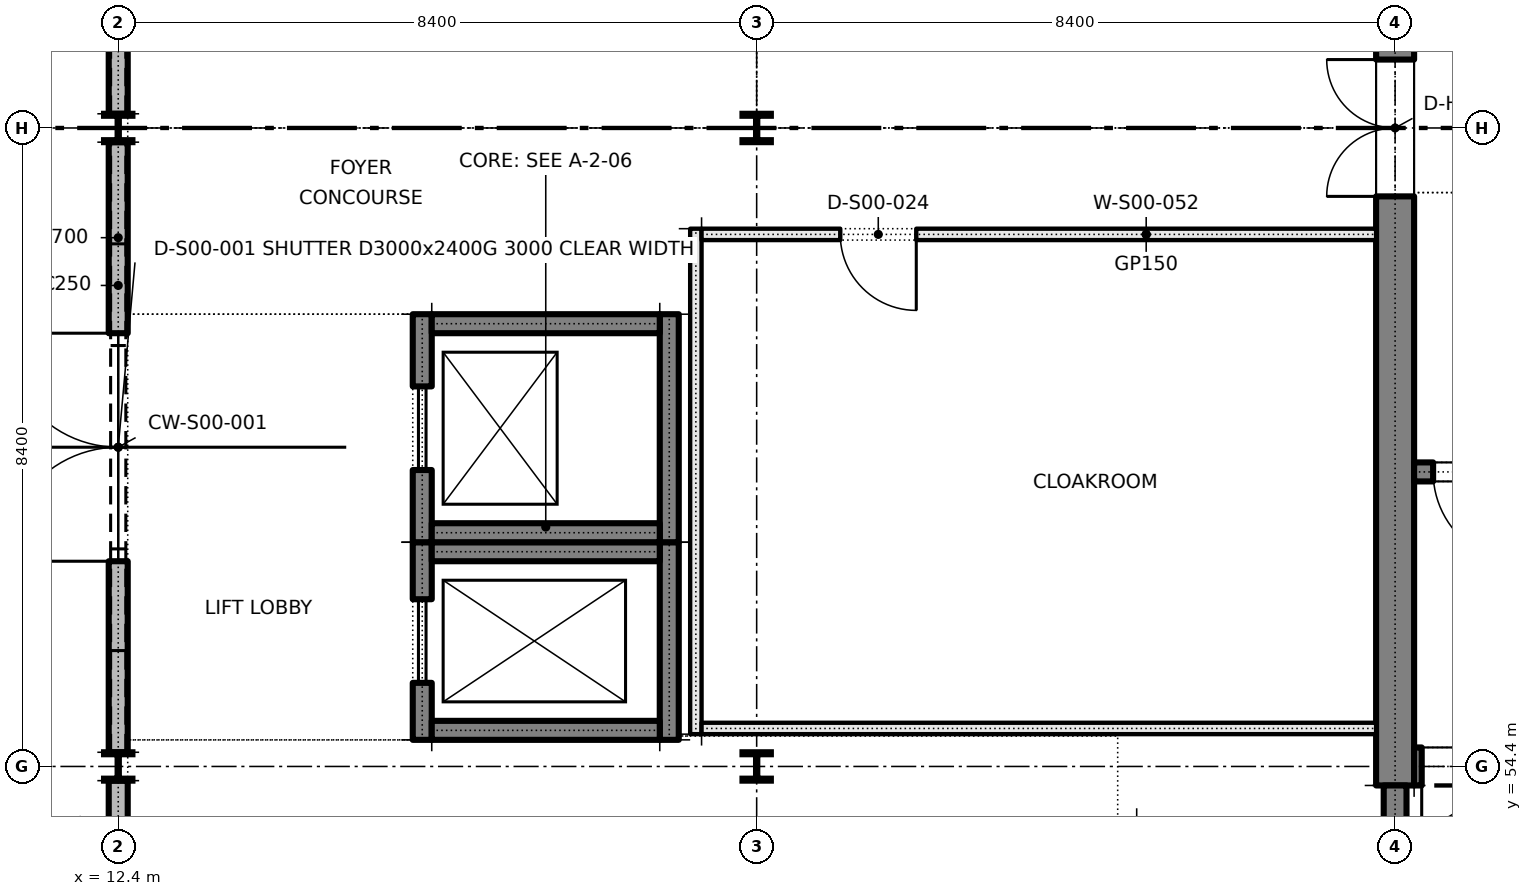
"""IFC4 building model, lengths in metres.
Left out: names, types, materials, properties, quantities, classifications, styles, units other than length and angle.
Written with IfcOpenShell. Run it as: python <this file> out.ifc"""

import sys

from ifc_helpers import new_model, si_unit, direction, frame, frame_2d, origin, origin_2d, place, context, subcontext, project, spatial, rectangle, i_section, extrude, element, fill, save


model = new_model("IFC4")
c1 = context("Model", 3, precision=1e-05, world=origin(), true_north=direction((0.0, 1.0)))
c2 = subcontext(c1, "Body", "Model", "MODEL_VIEW")
j1 = project(units=[si_unit("LENGTHUNIT", "METRE"), si_unit("PLANEANGLEUNIT", "RADIAN")], contexts=[c1])
p1 = place(None, origin())
s1 = spatial("IfcSite", under=j1, at=p1, CompositionType="ELEMENT")
p2 = place(p1, origin())
s2 = spatial("IfcBuilding", under=s1, at=p2, CompositionType="ELEMENT")
p3 = place(p2, origin())
s3 = spatial("IfcBuildingStorey", under=s2, at=p3, CompositionType="ELEMENT", Elevation=0.0)
p4 = place(p3, frame((29.2, 54.15, 0.0), z_axis=(0.0, 0.0, 1.0), x_axis=(0.0, 1.0, 0.0)))
e1 = element("IfcWall", 1, at=p4, inside=s3, PredefinedType="SOLIDWALL", context=c2, shape_type="SweptSolid", body=[
    extrude(rectangle(XDim=42.5, YDim=0.5, at=frame_2d((21.25, 0.0))), origin(), (0.0, 0.0, 1.0), 5.4),
])
p5 = place(p4, frame((7.75, 0.0, 0.0)))
e2 = element("IfcOpeningElement", 2, at=p5, cuts=e1, PredefinedType="OPENING", context=c2, shape_type="SweptSolid", body=[
    extrude(rectangle(XDim=1.8, YDim=2.1, at=frame_2d((0.9, 1.05))), frame((0.0, 0.26, 0.0), z_axis=(0.0, -1.0, 0.0), x_axis=(1.0, 0.0, 0.0)), (0.0, 0.0, 1.0), 0.52),
])
p6 = place(p4, frame((20.35, 0.0, 0.0)))
e3 = element("IfcOpeningElement", 3, at=p6, cuts=e1, PredefinedType="OPENING", context=c2, shape_type="SweptSolid", body=[
    extrude(rectangle(XDim=1.8, YDim=2.1, at=frame_2d((0.9, 1.05))), frame((0.0, 0.26, 0.0), z_axis=(0.0, -1.0, 0.0), x_axis=(1.0, 0.0, 0.0)), (0.0, 0.0, 1.0), 0.52),
])
p7 = place(p4, frame((32.95, 0.0, 0.0)))
e4 = element("IfcOpeningElement", 4, at=p7, cuts=e1, PredefinedType="OPENING", context=c2, shape_type="SweptSolid", body=[
    extrude(rectangle(XDim=1.8, YDim=2.1, at=frame_2d((0.9, 1.05))), frame((0.0, 0.26, 0.0), z_axis=(0.0, -1.0, 0.0), x_axis=(1.0, 0.0, 0.0)), (0.0, 0.0, 1.0), 0.52),
])
p8 = place(p3, frame((29.45, 54.4, 0.0), z_axis=(0.0, 0.0, 1.0), x_axis=(1.0, 0.0, 0.0)))
e5 = element("IfcWall", 5, at=p8, inside=s3, PredefinedType="SOLIDWALL", context=c2, shape_type="SweptSolid", body=[
    extrude(rectangle(XDim=66.7, YDim=0.5, at=frame_2d((33.35, 0.0))), origin(), (0.0, 0.0, 1.0), 5.4),
])
p9 = place(p8, frame((11.75, 0.0, 0.9)))
e6 = element("IfcOpeningElement", 6, at=p9, cuts=e5, PredefinedType="OPENING", context=c2, shape_type="SweptSolid", body=[
    extrude(rectangle(XDim=1.2, YDim=3.6, at=frame_2d((0.6, 1.8))), frame((0.0, 0.26, 0.0), z_axis=(0.0, -1.0, 0.0), x_axis=(1.0, 0.0, 0.0)), (0.0, 0.0, 1.0), 0.52),
])
p10 = place(p8, frame((20.15, 0.0, 0.9)))
e7 = element("IfcOpeningElement", 7, at=p10, cuts=e5, PredefinedType="OPENING", context=c2, shape_type="SweptSolid", body=[
    extrude(rectangle(XDim=1.2, YDim=3.6, at=frame_2d((0.6, 1.8))), frame((0.0, 0.26, 0.0), z_axis=(0.0, -1.0, 0.0), x_axis=(1.0, 0.0, 0.0)), (0.0, 0.0, 1.0), 0.52),
])
p11 = place(p8, frame((28.55, 0.0, 0.9)))
e8 = element("IfcOpeningElement", 8, at=p11, cuts=e5, PredefinedType="OPENING", context=c2, shape_type="SweptSolid", body=[
    extrude(rectangle(XDim=1.2, YDim=3.6, at=frame_2d((0.6, 1.8))), frame((0.0, 0.26, 0.0), z_axis=(0.0, -1.0, 0.0), x_axis=(1.0, 0.0, 0.0)), (0.0, 0.0, 1.0), 0.52),
])
p12 = place(p8, frame((36.95, 0.0, 0.9)))
e9 = element("IfcOpeningElement", 9, at=p12, cuts=e5, PredefinedType="OPENING", context=c2, shape_type="SweptSolid", body=[
    extrude(rectangle(XDim=1.2, YDim=3.6, at=frame_2d((0.6, 1.8))), frame((0.0, 0.26, 0.0), z_axis=(0.0, -1.0, 0.0), x_axis=(1.0, 0.0, 0.0)), (0.0, 0.0, 1.0), 0.52),
])
p13 = place(p8, frame((45.35, 0.0, 0.9)))
e10 = element("IfcOpeningElement", 10, at=p13, cuts=e5, PredefinedType="OPENING", context=c2, shape_type="SweptSolid", body=[
    extrude(rectangle(XDim=1.2, YDim=3.6, at=frame_2d((0.6, 1.8))), frame((0.0, 0.26, 0.0), z_axis=(0.0, -1.0, 0.0), x_axis=(1.0, 0.0, 0.0)), (0.0, 0.0, 1.0), 0.52),
])
p14 = place(p8, frame((53.75, 0.0, 0.9)))
e11 = element("IfcOpeningElement", 11, at=p14, cuts=e5, PredefinedType="OPENING", context=c2, shape_type="SweptSolid", body=[
    extrude(rectangle(XDim=1.2, YDim=3.6, at=frame_2d((0.6, 1.8))), frame((0.0, 0.26, 0.0), z_axis=(0.0, -1.0, 0.0), x_axis=(1.0, 0.0, 0.0)), (0.0, 0.0, 1.0), 0.52),
])
p15 = place(p8, frame((0.1, 0.0, 0.0)))
e12 = element("IfcOpeningElement", 12, at=p15, cuts=e5, PredefinedType="OPENING", context=c2, shape_type="SweptSolid", body=[
    extrude(rectangle(XDim=1.5, YDim=2.1, at=frame_2d((0.75, 1.05))), frame((0.0, 0.26, 0.0), z_axis=(0.0, -1.0, 0.0), x_axis=(1.0, 0.0, 0.0)), (0.0, 0.0, 1.0), 0.52),
])
p16 = place(p8, frame((59.2, 0.0, 0.0)))
e13 = element("IfcOpeningElement", 13, at=p16, cuts=e5, PredefinedType="OPENING", context=c2, shape_type="SweptSolid", body=[
    extrude(rectangle(XDim=1.5, YDim=2.1, at=frame_2d((0.75, 1.05))), frame((0.0, 0.26, 0.0), z_axis=(0.0, -1.0, 0.0), x_axis=(1.0, 0.0, 0.0)), (0.0, 0.0, 1.0), 0.52),
])
p17 = place(p3, frame((29.45, 58.275, 0.0), z_axis=(0.0, 0.0, 1.0), x_axis=(1.0, 0.0, 0.0)))
e14 = element("IfcWall", 14, at=p17, inside=s3, PredefinedType="SOLIDWALL", context=c2, shape_type="SweptSolid", body=[
    extrude(rectangle(XDim=7.85, YDim=0.25, at=frame_2d((3.925, 0.0))), origin(), (0.0, 0.0, 1.0), 5.4),
])
p18 = place(p17, frame((0.25, 0.0, 0.0)))
e15 = element("IfcOpeningElement", 15, at=p18, cuts=e14, PredefinedType="OPENING", context=c2, shape_type="SweptSolid", body=[
    extrude(rectangle(XDim=1.2, YDim=2.1, at=frame_2d((0.6, 1.05))), frame((0.0, 0.135, 0.0), z_axis=(0.0, -1.0, 0.0), x_axis=(1.0, 0.0, 0.0)), (0.0, 0.0, 1.0), 0.27),
])
for number, where, z_axis, x_axis in (
    (16, (12.4, 54.4, 0.0), (0.0, 0.0, 1.0), (1.0, 0.0, 0.0)),
    (17, (12.4, 62.8, 0.0), (0.0, 0.0, 1.0), (1.0, 0.0, 0.0)),
    (18, (20.8, 54.4, 0.0), (0.0, 0.0, 1.0), (1.0, 0.0, 0.0)),
    (19, (20.8, 62.8, 0.0), (0.0, 0.0, 1.0), (1.0, 0.0, 0.0)),
):
    element("IfcColumn", number, at=place(p3, frame(where, z_axis=z_axis, x_axis=x_axis)), inside=s3, PredefinedType="COLUMN", context=c2, shape_type="SweptSolid", body=[
        extrude(i_section(OverallWidth=0.373, OverallDepth=0.373, WebThickness=0.016, FlangeThickness=0.026, FilletRadius=0.015, at=origin_2d()), origin(), (0.0, 0.0, 1.0), 5.4),
    ])
p19 = place(p3, frame((29.2, 54.17, -0.3), z_axis=(0.0, 0.0, 1.0), x_axis=(0.0, 1.0, 0.0)))
e20 = element("IfcWall", 20, at=p19, inside=s3, PredefinedType="SOLIDWALL", context=c2, shape_type="SweptSolid", body=[
    extrude(rectangle(XDim=42.46, YDim=0.5, at=frame_2d((21.23, 0.0))), origin(), (0.0, 0.0, 1.0), 0.3),
])
p20 = place(p3, frame((29.45, 54.4, -0.5), z_axis=(0.0, 0.0, 1.0), x_axis=(1.0, 0.0, 0.0)))
e21 = element("IfcWall", 21, at=p20, inside=s3, PredefinedType="SOLIDWALL", context=c2, shape_type="SweptSolid", body=[
    extrude(rectangle(XDim=66.7, YDim=0.5, at=frame_2d((33.35, 0.0))), origin(), (0.0, 0.0, 1.0), 0.5),
])
p21 = place(p3, frame((29.45, 58.275, -0.5), z_axis=(0.0, 0.0, 1.0), x_axis=(1.0, 0.0, 0.0)))
e22 = element("IfcWall", 22, at=p21, inside=s3, PredefinedType="SOLIDWALL", context=c2, shape_type="SweptSolid", body=[
    extrude(rectangle(XDim=7.83, YDim=0.25, at=frame_2d((3.915, 0.0))), origin(), (0.0, 0.0, 1.0), 0.5),
])
p22 = place(p3, frame((12.4, 46.225, 0.0), z_axis=(0.0, 0.0, 1.0), x_axis=(0.0, 1.0, 0.0)))
e23 = element("IfcWall", 23, at=p22, inside=s3, PredefinedType="SOLIDWALL", context=c2, shape_type="SweptSolid", body=[
    extrude(rectangle(XDim=7.988, YDim=0.25, at=frame_2d((3.994, 0.0))), origin(), (0.0, 0.0, 1.0), 5.22),
])
p23 = place(p3, frame((12.4, 54.587, 0.0), z_axis=(0.0, 0.0, 1.0), x_axis=(0.0, 1.0, 0.0)))
e24 = element("IfcWall", 24, at=p23, inside=s3, PredefinedType="SOLIDWALL", context=c2, shape_type="SweptSolid", body=[
    extrude(rectangle(XDim=8.027, YDim=0.25, at=frame_2d((4.013, 0.0))), origin(), (0.0, 0.0, 1.0), 2.7),
])
p24 = place(p23, frame((2.513, 0.0, 0.0)))
e25 = element("IfcOpeningElement", 25, at=p24, cuts=e24, PredefinedType="OPENING", context=c2, shape_type="SweptSolid", body=[
    extrude(rectangle(XDim=3.0, YDim=2.4, at=frame_2d((1.5, 1.2))), frame((0.0, 0.135, 0.0), z_axis=(0.0, -1.0, 0.0), x_axis=(1.0, 0.0, 0.0)), (0.0, 0.0, 1.0), 0.27),
])
p25 = place(p3, frame((12.4, 62.987, 0.0), z_axis=(0.0, 0.0, 1.0), x_axis=(0.0, 1.0, 0.0)))
e26 = element("IfcWall", 26, at=p25, inside=s3, PredefinedType="SOLIDWALL", context=c2, shape_type="SweptSolid", body=[
    extrude(rectangle(XDim=8.027, YDim=0.25, at=frame_2d((4.013, 0.0))), origin(), (0.0, 0.0, 1.0), 2.7),
])
p26 = place(p25, frame((2.513, 0.0, 0.0)))
e27 = element("IfcOpeningElement", 27, at=p26, cuts=e26, PredefinedType="OPENING", context=c2, shape_type="SweptSolid", body=[
    extrude(rectangle(XDim=3.0, YDim=2.4, at=frame_2d((1.5, 1.2))), frame((0.0, 0.135, 0.0), z_axis=(0.0, -1.0, 0.0), x_axis=(1.0, 0.0, 0.0)), (0.0, 0.0, 1.0), 0.27),
])
p27 = place(p3, frame((29.2, 46.25, 0.0), z_axis=(0.0, 0.0, 1.0), x_axis=(0.0, 1.0, 0.0)))
e28 = element("IfcWall", 28, at=p27, inside=s3, PredefinedType="SOLIDWALL", context=c2, shape_type="SweptSolid", body=[
    extrude(rectangle(XDim=7.9, YDim=0.3, at=frame_2d((3.95, 0.0))), origin(), (0.0, 0.0, 1.0), 5.4),
])
p28 = place(p27, frame((0.3, 0.0, 0.0)))
e29 = element("IfcOpeningElement", 29, at=p28, cuts=e28, PredefinedType="OPENING", context=c2, shape_type="SweptSolid", body=[
    extrude(rectangle(XDim=1.1, YDim=2.1, at=frame_2d((0.55, 1.05))), frame((0.0, 0.16, 0.0), z_axis=(0.0, -1.0, 0.0), x_axis=(1.0, 0.0, 0.0)), (0.0, 0.0, 1.0), 0.32),
])
p29 = place(p3, frame((16.4, 54.75, 0.0), z_axis=(0.0, 0.0, 1.0), x_axis=(0.0, 1.0, 0.0)))
e30 = element("IfcWall", 30, at=p29, inside=s3, PredefinedType="SOLIDWALL", context=c2, shape_type="SweptSolid", body=[
    extrude(rectangle(XDim=2.6, YDim=0.25, at=frame_2d((1.3, 0.0))), origin(), (0.0, 0.0, 1.0), 5.4),
])
p30 = place(p29, frame((0.75, 0.0, 0.0)))
e31 = element("IfcOpeningElement", 31, at=p30, cuts=e30, PredefinedType="OPENING", context=c2, shape_type="SweptSolid", body=[
    extrude(rectangle(XDim=1.1, YDim=2.1, at=frame_2d((0.55, 1.05))), frame((0.0, 0.135, 0.0), z_axis=(0.0, -1.0, 0.0), x_axis=(1.0, 0.0, 0.0)), (0.0, 0.0, 1.0), 0.27),
])
p31 = place(p3, frame((19.65, 54.75, 0.0), z_axis=(0.0, 0.0, 1.0), x_axis=(0.0, 1.0, 0.0)))
e32 = element("IfcWall", 32, at=p31, inside=s3, PredefinedType="SOLIDWALL", context=c2, shape_type="SweptSolid", body=[
    extrude(rectangle(XDim=2.6, YDim=0.25, at=frame_2d((1.3, 0.0))), origin(), (0.0, 0.0, 1.0), 5.4),
])
for number, where, z_axis, x_axis in (
    (33, (16.525, 54.875, 0.0), (0.0, 0.0, 1.0), (1.0, 0.0, 0.0)),
    (34, (16.525, 57.225, 0.0), (0.0, 0.0, 1.0), (1.0, 0.0, 0.0)),
):
    element("IfcWall", number, at=place(p3, frame(where, z_axis=z_axis, x_axis=x_axis)), inside=s3, PredefinedType="SOLIDWALL", context=c2, shape_type="SweptSolid", body=[
        extrude(rectangle(XDim=3.0, YDim=0.25, at=frame_2d((1.5, 0.0))), origin(), (0.0, 0.0, 1.0), 5.4),
    ])
p32 = place(p3, frame((16.4, 57.35, 0.0), z_axis=(0.0, 0.0, 1.0), x_axis=(0.0, 1.0, 0.0)))
e35 = element("IfcWall", 35, at=p32, inside=s3, PredefinedType="SOLIDWALL", context=c2, shape_type="SweptSolid", body=[
    extrude(rectangle(XDim=3.0, YDim=0.25, at=frame_2d((1.5, 0.0))), origin(), (0.0, 0.0, 1.0), 5.4),
])
p33 = place(p32, frame((0.95, 0.0, 0.0)))
e36 = element("IfcOpeningElement", 36, at=p33, cuts=e35, PredefinedType="OPENING", context=c2, shape_type="SweptSolid", body=[
    extrude(rectangle(XDim=1.1, YDim=2.1, at=frame_2d((0.55, 1.05))), frame((0.0, 0.135, 0.0), z_axis=(0.0, -1.0, 0.0), x_axis=(1.0, 0.0, 0.0)), (0.0, 0.0, 1.0), 0.27),
])
for number, where, z_axis, x_axis in (
    (37, (19.65, 57.35, 0.0), (0.0, 0.0, 1.0), (0.0, 1.0, 0.0)),
    (38, (16.525, 57.475, 0.0), (0.0, 0.0, 1.0), (1.0, 0.0, 0.0)),
    (39, (16.525, 60.225, 0.0), (0.0, 0.0, 1.0), (1.0, 0.0, 0.0)),
):
    element("IfcWall", number, at=place(p3, frame(where, z_axis=z_axis, x_axis=x_axis)), inside=s3, PredefinedType="SOLIDWALL", context=c2, shape_type="SweptSolid", body=[
        extrude(rectangle(XDim=3.0, YDim=0.25, at=frame_2d((1.5, 0.0))), origin(), (0.0, 0.0, 1.0), 5.4),
    ])
p34 = place(p3, frame((20.0, 54.825, 0.0), z_axis=(0.0, 0.0, 1.0), x_axis=(0.0, 1.0, 0.0)))
e40 = element("IfcWall", 40, at=p34, inside=s3, PredefinedType="PARTITIONING", context=c2, shape_type="SweptSolid", body=[
    extrude(rectangle(XDim=6.65, YDim=0.15, at=frame_2d((3.325, 0.0))), origin(), (0.0, 0.0, 1.0), 5.4),
])
p35 = place(p3, frame((20.075, 54.9, 0.0), z_axis=(0.0, 0.0, 1.0), x_axis=(1.0, 0.0, 0.0)))
e41 = element("IfcWall", 41, at=p35, inside=s3, PredefinedType="PARTITIONING", context=c2, shape_type="SweptSolid", body=[
    extrude(rectangle(XDim=8.875, YDim=0.15, at=frame_2d((4.438, 0.0))), origin(), (0.0, 0.0, 1.0), 5.4),
])
p36 = place(p3, frame((20.075, 61.4, 0.0), z_axis=(0.0, 0.0, 1.0), x_axis=(1.0, 0.0, 0.0)))
e42 = element("IfcWall", 42, at=p36, inside=s3, PredefinedType="PARTITIONING", context=c2, shape_type="SweptSolid", body=[
    extrude(rectangle(XDim=8.875, YDim=0.15, at=frame_2d((4.438, 0.0))), origin(), (0.0, 0.0, 1.0), 5.4),
])
p37 = place(p36, frame((1.825, 0.0, 0.0)))
e43 = element("IfcOpeningElement", 43, at=p37, cuts=e42, PredefinedType="OPENING", context=c2, shape_type="SweptSolid", body=[
    extrude(rectangle(XDim=1.0, YDim=2.1, at=frame_2d((0.5, 1.05))), frame((0.0, 0.085, 0.0), z_axis=(0.0, -1.0, 0.0), x_axis=(1.0, 0.0, 0.0)), (0.0, 0.0, 1.0), 0.17),
])
p38 = place(p3, frame((29.2, 47.67, -0.2), z_axis=(0.0, 0.0, 1.0), x_axis=(0.0, 1.0, 0.0)))
e44 = element("IfcWall", 44, at=p38, inside=s3, PredefinedType="SOLIDWALL", context=c2, shape_type="SweptSolid", body=[
    extrude(rectangle(XDim=6.41, YDim=0.3, at=frame_2d((3.205, 0.0))), origin(), (0.0, 0.0, 1.0), 0.2),
])
p39 = place(p24, origin())
e45 = element("IfcDoor", 45, at=p39, inside=s3, OperationType="DOUBLE_DOOR_SINGLE_SWING", PredefinedType="DOOR", context=c2, shape_type="SweptSolid", body=[
    extrude(rectangle(XDim=3.0, YDim=2.4, at=frame_2d((1.5, 1.2))), frame((0.0, 0.025, 0.0), z_axis=(0.0, -1.0, 0.0), x_axis=(1.0, 0.0, 0.0)), (0.0, 0.0, 1.0), 0.05),
])
fill(e25, e45)
p40 = place(p18, frame((1.2, 0.0, 0.0), z_axis=(0.0, 0.0, 1.0), x_axis=(-1.0, 0.0, 0.0)))
e46 = element("IfcDoor", 46, at=p40, inside=s3, OperationType="SINGLE_SWING_LEFT", PredefinedType="DOOR", context=c2, shape_type="SweptSolid", body=[
    extrude(rectangle(XDim=1.2, YDim=2.1, at=frame_2d((0.6, 1.05))), frame((0.0, 0.025, 0.0), z_axis=(0.0, -1.0, 0.0), x_axis=(1.0, 0.0, 0.0)), (0.0, 0.0, 1.0), 0.05),
])
fill(e15, e46)
p41 = place(p15, frame((1.5, 0.0, 0.0), z_axis=(0.0, 0.0, 1.0), x_axis=(-1.0, 0.0, 0.0)))
e47 = element("IfcDoor", 47, at=p41, inside=s3, OperationType="DOUBLE_DOOR_SINGLE_SWING", PredefinedType="DOOR", context=c2, shape_type="SweptSolid", body=[
    extrude(rectangle(XDim=1.5, YDim=2.1, at=frame_2d((0.75, 1.05))), frame((0.0, 0.025, 0.0), z_axis=(0.0, -1.0, 0.0), x_axis=(1.0, 0.0, 0.0)), (0.0, 0.0, 1.0), 0.05),
])
fill(e12, e47)
p42 = place(p5, origin())
e48 = element("IfcDoor", 48, at=p42, inside=s3, OperationType="DOUBLE_DOOR_SINGLE_SWING", PredefinedType="DOOR", context=c2, shape_type="SweptSolid", body=[
    extrude(rectangle(XDim=1.8, YDim=2.1, at=frame_2d((0.9, 1.05))), frame((0.0, 0.025, 0.0), z_axis=(0.0, -1.0, 0.0), x_axis=(1.0, 0.0, 0.0)), (0.0, 0.0, 1.0), 0.05),
])
fill(e2, e48)
p43 = place(p30, origin())
e49 = element("IfcDoor", 49, at=p43, inside=s3, OperationType="SLIDING_TO_LEFT", PredefinedType="DOOR", context=c2, shape_type="SweptSolid", body=[
    extrude(rectangle(XDim=1.1, YDim=2.1, at=frame_2d((0.55, 1.05))), frame((0.0, 0.025, 0.0), z_axis=(0.0, -1.0, 0.0), x_axis=(1.0, 0.0, 0.0)), (0.0, 0.0, 1.0), 0.05),
])
fill(e31, e49)
p44 = place(p33, origin())
e50 = element("IfcDoor", 50, at=p44, inside=s3, OperationType="SLIDING_TO_LEFT", PredefinedType="DOOR", context=c2, shape_type="SweptSolid", body=[
    extrude(rectangle(XDim=1.1, YDim=2.1, at=frame_2d((0.55, 1.05))), frame((0.0, 0.025, 0.0), z_axis=(0.0, -1.0, 0.0), x_axis=(1.0, 0.0, 0.0)), (0.0, 0.0, 1.0), 0.05),
])
fill(e36, e50)
p45 = place(p37, frame((1.0, 0.0, 0.0), z_axis=(0.0, 0.0, 1.0), x_axis=(-1.0, 0.0, 0.0)))
e51 = element("IfcDoor", 51, at=p45, inside=s3, OperationType="SINGLE_SWING_LEFT", PredefinedType="DOOR", context=c2, shape_type="SweptSolid", body=[
    extrude(rectangle(XDim=1.0, YDim=2.1, at=frame_2d((0.5, 1.05))), frame((0.0, 0.025, 0.0), z_axis=(0.0, -1.0, 0.0), x_axis=(1.0, 0.0, 0.0)), (0.0, 0.0, 1.0), 0.05),
])
fill(e43, e51)
save(model, sys.argv[1])
